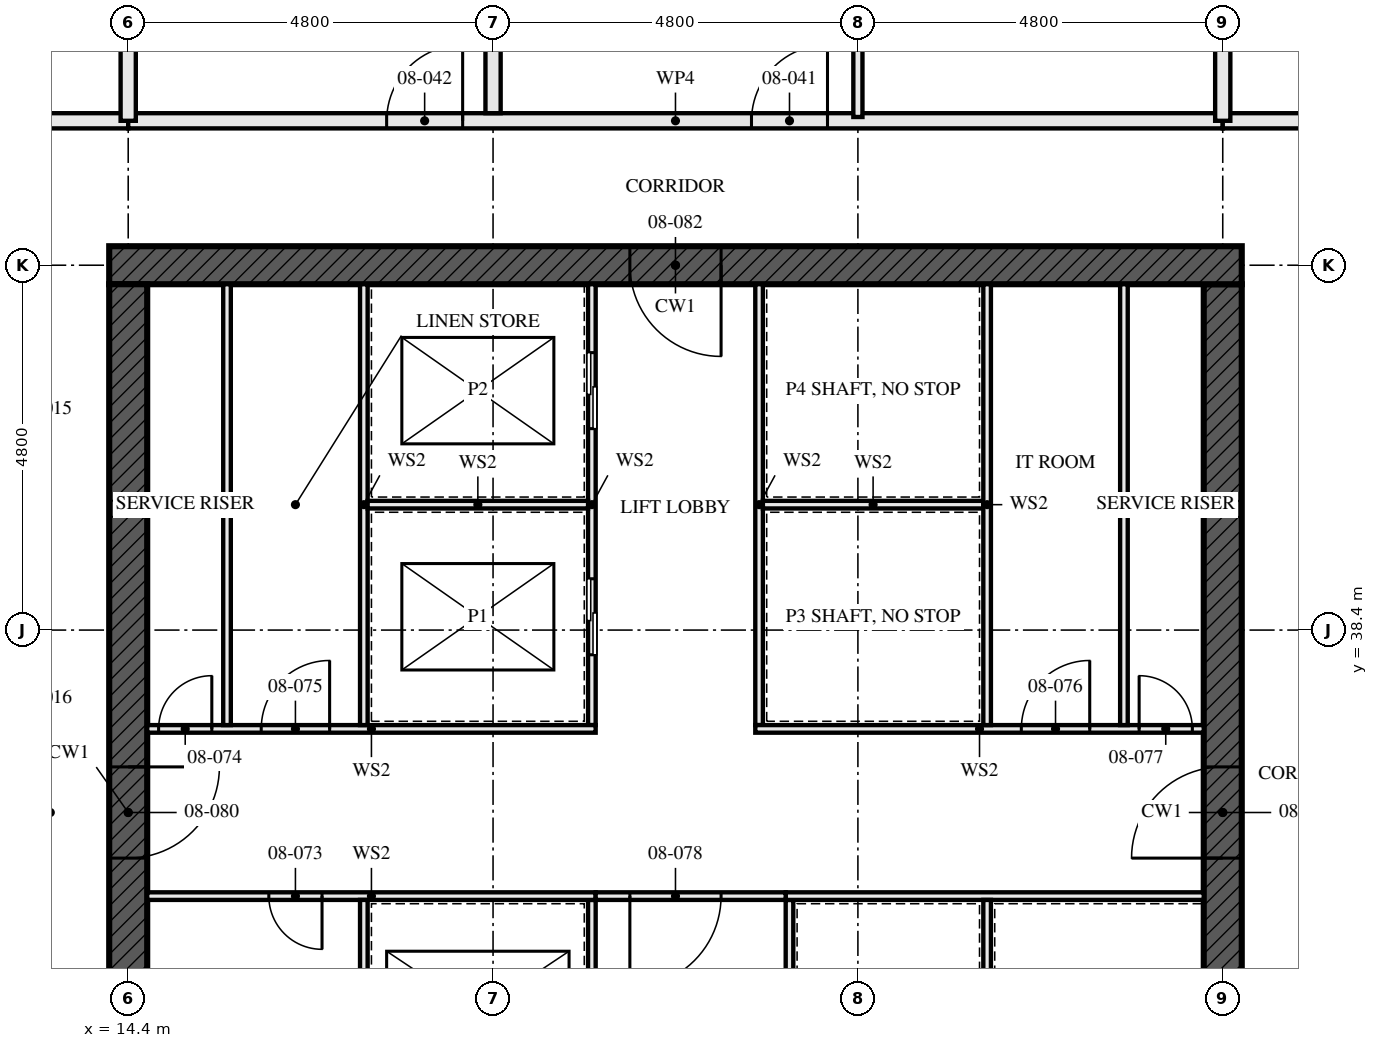
"""IFC4 building model, lengths in metres.
Left out: names, types, materials, properties, quantities, classifications, styles, units other than length and angle.
Written with IfcOpenShell. Run it as: python <this file> out.ifc"""

import sys

from ifc_helpers import new_model, si_unit, direction, frame, frame_2d, origin, place, context, subcontext, project, spatial, rectangle, extrude, element, fill, save


model = new_model("IFC4")
c1 = context("Model", 3, precision=1e-05, world=origin(), true_north=direction((0.0, 1.0)))
c2 = subcontext(c1, "Body", "Model", "MODEL_VIEW")
j1 = project(units=[si_unit("LENGTHUNIT", "METRE"), si_unit("PLANEANGLEUNIT", "RADIAN")], contexts=[c1])
p1 = place(None, origin())
s1 = spatial("IfcSite", under=j1, at=p1, CompositionType="ELEMENT")
p2 = place(p1, origin())
s2 = spatial("IfcBuilding", under=s1, at=p2, CompositionType="ELEMENT")
p3 = place(p2, frame((0.0, 0.0, 34.0)))
s3 = spatial("IfcBuildingStorey", under=s2, at=p3, CompositionType="ELEMENT", Elevation=34.0)
p4 = place(p3, frame((29.05, 43.2, -0.17), z_axis=(0.0, 0.0, 1.0), x_axis=(-1.0, 0.0, 0.0)))
e1 = element("IfcWall", 1, at=p4, inside=s3, PredefinedType="SHEAR", context=c2, shape_type="SweptSolid", body=[
    extrude(rectangle(XDim=14.9, YDim=0.5, at=frame_2d((7.45, 0.0))), origin(), (0.0, 0.0, 1.0), 3.5),
])
p5 = place(p4, frame((6.85, 0.0, 0.17)))
e2 = element("IfcOpeningElement", 2, at=p5, cuts=e1, PredefinedType="OPENING", context=c2, shape_type="SweptSolid", body=[
    extrude(rectangle(XDim=1.2, YDim=2.1, at=frame_2d((0.6, 1.05))), frame((0.0, 0.26, 0.0), z_axis=(0.0, -1.0, 0.0), x_axis=(1.0, 0.0, 0.0)), (0.0, 0.0, 1.0), 0.521),
])
p6 = place(p3, frame((14.4, 42.95, -0.17), z_axis=(0.0, 0.0, 1.0), x_axis=(0.0, -1.0, 0.0)))
e3 = element("IfcWall", 3, at=p6, inside=s3, PredefinedType="SHEAR", context=c2, shape_type="SweptSolid", body=[
    extrude(rectangle(XDim=13.9, YDim=0.5, at=frame_2d((6.95, 0.0))), origin(), (0.0, 0.0, 1.0), 3.5),
])
p7 = place(p6, frame((6.35, 0.0, 0.17)))
e4 = element("IfcOpeningElement", 4, at=p7, cuts=e3, PredefinedType="OPENING", context=c2, shape_type="SweptSolid", body=[
    extrude(rectangle(XDim=1.2, YDim=2.1, at=frame_2d((0.6, 1.05))), frame((0.0, 0.26, 0.0), z_axis=(0.0, -1.0, 0.0), x_axis=(1.0, 0.0, 0.0)), (0.0, 0.0, 1.0), 0.521),
])
p8 = place(p3, frame((28.8, 29.05, -0.17), z_axis=(0.0, 0.0, 1.0), x_axis=(0.0, 1.0, 0.0)))
e5 = element("IfcWall", 5, at=p8, inside=s3, PredefinedType="SHEAR", context=c2, shape_type="SweptSolid", body=[
    extrude(rectangle(XDim=13.9, YDim=0.5, at=frame_2d((6.95, 0.0))), origin(), (0.0, 0.0, 1.0), 3.5),
])
p9 = place(p8, frame((6.35, 0.0, 0.17)))
e6 = element("IfcOpeningElement", 6, at=p9, cuts=e5, PredefinedType="OPENING", context=c2, shape_type="SweptSolid", body=[
    extrude(rectangle(XDim=1.2, YDim=2.1, at=frame_2d((0.6, 1.05))), frame((0.0, 0.26, 0.0), z_axis=(0.0, -1.0, 0.0), x_axis=(1.0, 0.0, 0.0)), (0.0, 0.0, 1.0), 0.521),
])
p10 = place(p3, frame((14.4, 45.1, 0.0), z_axis=(0.0, 0.0, 1.0), x_axis=(-1.0, 0.0, 0.0)))
e7 = element("IfcWall", 7, at=p10, inside=s3, PredefinedType="PARTITIONING", context=c2, shape_type="SweptSolid", body=[
    extrude(rectangle(XDim=9.6, YDim=0.2, at=frame_2d((4.8, 0.0))), origin(), (0.0, 0.0, 1.0), 3.33),
])
p11 = place(p10, frame((5.2, 0.0, 0.0)))
e8 = element("IfcOpeningElement", 8, at=p11, cuts=e7, PredefinedType="OPENING", context=c2, shape_type="SweptSolid", body=[
    extrude(rectangle(XDim=1.0, YDim=2.1, at=frame_2d((0.5, 1.05))), frame((0.0, 0.111, 0.0), z_axis=(0.0, -1.0, 0.0), x_axis=(1.0, 0.0, 0.0)), (0.0, 0.0, 1.0), 0.221),
])
p12 = place(p3, frame((24.0, 51.9, 0.0), z_axis=(0.0, 0.0, 1.0), x_axis=(0.0, -1.0, 0.0)))
e9 = element("IfcWall", 9, at=p12, inside=s3, PredefinedType="PARTITIONING", context=c2, shape_type="SweptSolid", body=[
    extrude(rectangle(XDim=6.75, YDim=0.12, at=frame_2d((3.375, 0.0))), origin(), (0.0, 0.0, 1.0), 2.55),
])
p13 = place(p12, frame((2.925, 0.0, 0.0)))
e10 = element("IfcOpeningElement", 10, at=p13, cuts=e9, PredefinedType="OPENING", context=c2, shape_type="SweptSolid", body=[
    extrude(rectangle(XDim=0.9, YDim=2.1, at=frame_2d((0.45, 1.05))), frame((0.0, 0.071, 0.0), z_axis=(0.0, -1.0, 0.0), x_axis=(1.0, 0.0, 0.0)), (0.0, 0.0, 1.0), 0.141),
])
p14 = place(p3, frame((19.2, 57.255, 0.0), z_axis=(0.0, 0.0, 1.0), x_axis=(0.0, -1.0, 0.0)))
e11 = element("IfcWall", 11, at=p14, inside=s3, PredefinedType="PARTITIONING", context=c2, shape_type="SweptSolid", body=[
    extrude(rectangle(XDim=12.055, YDim=0.2, at=frame_2d((6.027, 0.0))), origin(), (0.0, 0.0, 1.0), 2.55),
])
p15 = place(p3, frame((28.8, 45.1, 0.0), z_axis=(0.0, 0.0, 1.0), x_axis=(-1.0, 0.0, 0.0)))
e12 = element("IfcWall", 12, at=p15, inside=s3, PredefinedType="PARTITIONING", context=c2, shape_type="SweptSolid", body=[
    extrude(rectangle(XDim=14.4, YDim=0.2, at=frame_2d((7.2, 0.0))), origin(), (0.0, 0.0, 1.0), 3.33),
])
p16 = place(p15, frame((5.2, 0.0, 0.0)))
e13 = element("IfcOpeningElement", 13, at=p16, cuts=e12, PredefinedType="OPENING", context=c2, shape_type="SweptSolid", body=[
    extrude(rectangle(XDim=1.0, YDim=2.1, at=frame_2d((0.5, 1.05))), frame((0.0, 0.111, 0.0), z_axis=(0.0, -1.0, 0.0), x_axis=(1.0, 0.0, 0.0)), (0.0, 0.0, 1.0), 0.221),
])
p17 = place(p15, frame((10.0, 0.0, 0.0)))
e14 = element("IfcOpeningElement", 14, at=p17, cuts=e12, PredefinedType="OPENING", context=c2, shape_type="SweptSolid", body=[
    extrude(rectangle(XDim=1.0, YDim=2.1, at=frame_2d((0.5, 1.05))), frame((0.0, 0.111, 0.0), z_axis=(0.0, -1.0, 0.0), x_axis=(1.0, 0.0, 0.0)), (0.0, 0.0, 1.0), 0.221),
])
p18 = place(p3, frame((38.4, 45.1, 0.0), z_axis=(0.0, 0.0, 1.0), x_axis=(-1.0, 0.0, 0.0)))
e15 = element("IfcWall", 15, at=p18, inside=s3, PredefinedType="PARTITIONING", context=c2, shape_type="SweptSolid", body=[
    extrude(rectangle(XDim=9.6, YDim=0.2, at=frame_2d((4.8, 0.0))), origin(), (0.0, 0.0, 1.0), 3.33),
])
p19 = place(p18, frame((0.4, 0.0, 0.0)))
e16 = element("IfcOpeningElement", 16, at=p19, cuts=e15, PredefinedType="OPENING", context=c2, shape_type="SweptSolid", body=[
    extrude(rectangle(XDim=1.0, YDim=2.1, at=frame_2d((0.5, 1.05))), frame((0.0, 0.111, 0.0), z_axis=(0.0, -1.0, 0.0), x_axis=(1.0, 0.0, 0.0)), (0.0, 0.0, 1.0), 0.221),
])
p20 = place(p18, frame((5.2, 0.0, 0.0)))
e17 = element("IfcOpeningElement", 17, at=p20, cuts=e15, PredefinedType="OPENING", context=c2, shape_type="SweptSolid", body=[
    extrude(rectangle(XDim=1.0, YDim=2.1, at=frame_2d((0.5, 1.05))), frame((0.0, 0.111, 0.0), z_axis=(0.0, -1.0, 0.0), x_axis=(1.0, 0.0, 0.0)), (0.0, 0.0, 1.0), 0.221),
])
for number, where, z_axis, x_axis in (
    (18, (15.7, 37.15, 0.0), (0.0, 0.0, 1.0), (0.0, 1.0, 0.0)),
    (19, (27.5, 37.15, 0.0), (0.0, 0.0, 1.0), (0.0, 1.0, 0.0)),
):
    element("IfcWall", number, at=place(p3, frame(where, z_axis=z_axis, x_axis=x_axis)), inside=s3, PredefinedType="SOLIDWALL", context=c2, shape_type="SweptSolid", body=[
        extrude(rectangle(XDim=5.8, YDim=0.1, at=frame_2d((2.9, 0.0))), origin(), (0.0, 0.0, 1.0), 3.33),
    ])
p21 = place(p3, frame((20.5, 29.05, 0.0), z_axis=(0.0, 0.0, 1.0), x_axis=(0.0, 1.0, 0.0)))
e20 = element("IfcWall", 20, at=p21, inside=s3, PredefinedType="SOLIDWALL", context=c2, shape_type="SweptSolid", body=[
    extrude(rectangle(XDim=5.8, YDim=0.1, at=frame_2d((2.9, 0.0))), origin(), (0.0, 0.0, 1.0), 3.33),
])
p22 = place(p21, frame((0.8, 0.0, 0.0)))
e21 = element("IfcOpeningElement", 21, at=p22, cuts=e20, PredefinedType="OPENING", context=c2, shape_type="SweptSolid", body=[
    extrude(rectangle(XDim=1.1, YDim=2.3, at=frame_2d((0.55, 1.15))), frame((0.0, 0.061, 0.0), z_axis=(0.0, -1.0, 0.0), x_axis=(1.0, 0.0, 0.0)), (0.0, 0.0, 1.0), 0.121),
])
p23 = place(p21, frame((3.775, 0.0, 0.0)))
e22 = element("IfcOpeningElement", 22, at=p23, cuts=e20, PredefinedType="OPENING", context=c2, shape_type="SweptSolid", body=[
    extrude(rectangle(XDim=1.1, YDim=2.3, at=frame_2d((0.55, 1.15))), frame((0.0, 0.061, 0.0), z_axis=(0.0, -1.0, 0.0), x_axis=(1.0, 0.0, 0.0)), (0.0, 0.0, 1.0), 0.121),
])
p24 = place(p3, frame((20.5, 37.15, 0.0), z_axis=(0.0, 0.0, 1.0), x_axis=(0.0, 1.0, 0.0)))
e23 = element("IfcWall", 23, at=p24, inside=s3, PredefinedType="SOLIDWALL", context=c2, shape_type="SweptSolid", body=[
    extrude(rectangle(XDim=5.8, YDim=0.1, at=frame_2d((2.9, 0.0))), origin(), (0.0, 0.0, 1.0), 3.33),
])
p25 = place(p24, frame((0.925, 0.0, 0.0)))
e24 = element("IfcOpeningElement", 24, at=p25, cuts=e23, PredefinedType="OPENING", context=c2, shape_type="SweptSolid", body=[
    extrude(rectangle(XDim=1.0, YDim=2.1, at=frame_2d((0.5, 1.05))), frame((0.0, 0.061, 0.0), z_axis=(0.0, -1.0, 0.0), x_axis=(1.0, 0.0, 0.0)), (0.0, 0.0, 1.0), 0.121),
])
p26 = place(p24, frame((3.9, 0.0, 0.0)))
e25 = element("IfcOpeningElement", 25, at=p26, cuts=e23, PredefinedType="OPENING", context=c2, shape_type="SweptSolid", body=[
    extrude(rectangle(XDim=1.0, YDim=2.1, at=frame_2d((0.5, 1.05))), frame((0.0, 0.061, 0.0), z_axis=(0.0, -1.0, 0.0), x_axis=(1.0, 0.0, 0.0)), (0.0, 0.0, 1.0), 0.121),
])
p27 = place(p3, frame((22.7, 37.15, 0.0), z_axis=(0.0, 0.0, 1.0), x_axis=(0.0, 1.0, 0.0)))
e26 = element("IfcWall", 26, at=p27, inside=s3, PredefinedType="SOLIDWALL", context=c2, shape_type="SweptSolid", body=[
    extrude(rectangle(XDim=5.8, YDim=0.1, at=frame_2d((2.9, 0.0))), origin(), (0.0, 0.0, 1.0), 3.33),
])
p28 = place(p3, frame((23.1, 29.05, 0.0), z_axis=(0.0, 0.0, 1.0), x_axis=(0.0, 1.0, 0.0)))
e27 = element("IfcWall", 27, at=p28, inside=s3, PredefinedType="SOLIDWALL", context=c2, shape_type="SweptSolid", body=[
    extrude(rectangle(XDim=5.8, YDim=0.1, at=frame_2d((2.9, 0.0))), origin(), (0.0, 0.0, 1.0), 3.33),
])
p29 = place(p28, frame((1.0, 0.0, 0.0)))
e28 = element("IfcOpeningElement", 28, at=p29, cuts=e27, PredefinedType="OPENING", context=c2, shape_type="SweptSolid", body=[
    extrude(rectangle(XDim=0.7, YDim=2.1, at=frame_2d((0.35, 1.05))), frame((0.0, 0.061, 0.0), z_axis=(0.0, -1.0, 0.0), x_axis=(1.0, 0.0, 0.0)), (0.0, 0.0, 1.0), 0.121),
])
p30 = place(p3, frame((14.65, 34.9, 0.0), z_axis=(0.0, 0.0, 1.0), x_axis=(1.0, 0.0, 0.0)))
e29 = element("IfcWall", 29, at=p30, inside=s3, PredefinedType="SOLIDWALL", context=c2, shape_type="SweptSolid", body=[
    extrude(rectangle(XDim=5.9, YDim=0.1, at=frame_2d((2.95, 0.0))), origin(), (0.0, 0.0, 1.0), 3.33),
])
p31 = place(p30, frame((1.6, 0.0, 0.0)))
e30 = element("IfcOpeningElement", 30, at=p31, cuts=e29, PredefinedType="OPENING", context=c2, shape_type="SweptSolid", body=[
    extrude(rectangle(XDim=0.7, YDim=2.1, at=frame_2d((0.35, 1.05))), frame((0.0, 0.061, 0.0), z_axis=(0.0, -1.0, 0.0), x_axis=(1.0, 0.0, 0.0)), (0.0, 0.0, 1.0), 0.121),
])
p32 = place(p3, frame((23.05, 34.9, 0.0), z_axis=(0.0, 0.0, 1.0), x_axis=(1.0, 0.0, 0.0)))
e31 = element("IfcWall", 31, at=p32, inside=s3, PredefinedType="SOLIDWALL", context=c2, shape_type="SweptSolid", body=[
    extrude(rectangle(XDim=5.5, YDim=0.1, at=frame_2d((2.75, 0.0))), origin(), (0.0, 0.0, 1.0), 3.33),
])
p33 = place(p3, frame((14.65, 37.1, 0.0), z_axis=(0.0, 0.0, 1.0), x_axis=(1.0, 0.0, 0.0)))
e32 = element("IfcWall", 32, at=p33, inside=s3, PredefinedType="SOLIDWALL", context=c2, shape_type="SweptSolid", body=[
    extrude(rectangle(XDim=5.9, YDim=0.1, at=frame_2d((2.95, 0.0))), origin(), (0.0, 0.0, 1.0), 3.33),
])
p34 = place(p33, frame((0.15, 0.0, 0.0)))
e33 = element("IfcOpeningElement", 33, at=p34, cuts=e32, PredefinedType="OPENING", context=c2, shape_type="SweptSolid", body=[
    extrude(rectangle(XDim=0.7, YDim=2.1, at=frame_2d((0.35, 1.05))), frame((0.0, 0.061, 0.0), z_axis=(0.0, -1.0, 0.0), x_axis=(1.0, 0.0, 0.0)), (0.0, 0.0, 1.0), 0.121),
])
p35 = place(p33, frame((1.5, 0.0, 0.0)))
e34 = element("IfcOpeningElement", 34, at=p35, cuts=e32, PredefinedType="OPENING", context=c2, shape_type="SweptSolid", body=[
    extrude(rectangle(XDim=0.9, YDim=2.1, at=frame_2d((0.45, 1.05))), frame((0.0, 0.061, 0.0), z_axis=(0.0, -1.0, 0.0), x_axis=(1.0, 0.0, 0.0)), (0.0, 0.0, 1.0), 0.121),
])
p36 = place(p3, frame((22.65, 37.1, 0.0), z_axis=(0.0, 0.0, 1.0), x_axis=(1.0, 0.0, 0.0)))
e35 = element("IfcWall", 35, at=p36, inside=s3, PredefinedType="SOLIDWALL", context=c2, shape_type="SweptSolid", body=[
    extrude(rectangle(XDim=5.9, YDim=0.1, at=frame_2d((2.95, 0.0))), origin(), (0.0, 0.0, 1.0), 3.33),
])
p37 = place(p36, frame((3.5, 0.0, 0.0)))
e36 = element("IfcOpeningElement", 36, at=p37, cuts=e35, PredefinedType="OPENING", context=c2, shape_type="SweptSolid", body=[
    extrude(rectangle(XDim=0.9, YDim=2.1, at=frame_2d((0.45, 1.05))), frame((0.0, 0.061, 0.0), z_axis=(0.0, -1.0, 0.0), x_axis=(1.0, 0.0, 0.0)), (0.0, 0.0, 1.0), 0.121),
])
p38 = place(p36, frame((5.05, 0.0, 0.0)))
e37 = element("IfcOpeningElement", 37, at=p38, cuts=e35, PredefinedType="OPENING", context=c2, shape_type="SweptSolid", body=[
    extrude(rectangle(XDim=0.7, YDim=2.1, at=frame_2d((0.35, 1.05))), frame((0.0, 0.061, 0.0), z_axis=(0.0, -1.0, 0.0), x_axis=(1.0, 0.0, 0.0)), (0.0, 0.0, 1.0), 0.121),
])
p39 = place(p3, frame((20.55, 34.9, 0.0), z_axis=(0.0, 0.0, 1.0), x_axis=(1.0, 0.0, 0.0)))
e38 = element("IfcWall", 38, at=p39, inside=s3, PredefinedType="SOLIDWALL", context=c2, shape_type="SweptSolid", body=[
    extrude(rectangle(XDim=2.5, YDim=0.1, at=frame_2d((1.25, 0.0))), origin(), (0.0, 0.0, 1.0), 3.33),
])
p40 = place(p39, frame((0.45, 0.0, 0.0)))
e39 = element("IfcOpeningElement", 39, at=p40, cuts=e38, PredefinedType="OPENING", context=c2, shape_type="SweptSolid", body=[
    extrude(rectangle(XDim=1.2, YDim=2.1, at=frame_2d((0.6, 1.05))), frame((0.0, 0.061, 0.0), z_axis=(0.0, -1.0, 0.0), x_axis=(1.0, 0.0, 0.0)), (0.0, 0.0, 1.0), 0.121),
])
for number, where, z_axis, x_axis in (
    (40, (17.5, 29.05, 0.0), (0.0, 0.0, 1.0), (0.0, 1.0, 0.0)),
    (41, (17.5, 37.15, 0.0), (0.0, 0.0, 1.0), (0.0, 1.0, 0.0)),
):
    element("IfcWall", number, at=place(p3, frame(where, z_axis=z_axis, x_axis=x_axis)), inside=s3, PredefinedType="SOLIDWALL", context=c2, shape_type="SweptSolid", body=[
        extrude(rectangle(XDim=5.8, YDim=0.1, at=frame_2d((2.9, 0.0))), origin(), (0.0, 0.0, 1.0), 3.33),
    ])
for number, where, z_axis, x_axis in (
    (42, (17.55, 40.05, 0.0), (0.0, 0.0, 1.0), (1.0, 0.0, 0.0)),
    (43, (22.75, 40.05, 0.0), (0.0, 0.0, 1.0), (1.0, 0.0, 0.0)),
):
    element("IfcWall", number, at=place(p3, frame(where, z_axis=z_axis, x_axis=x_axis)), inside=s3, PredefinedType="SOLIDWALL", context=c2, shape_type="SweptSolid", body=[
        extrude(rectangle(XDim=2.9, YDim=0.1, at=frame_2d((1.45, 0.0))), origin(), (0.0, 0.0, 1.0), 3.33),
    ])
p41 = place(p3, frame((25.7, 37.15, 0.0), z_axis=(0.0, 0.0, 1.0), x_axis=(0.0, 1.0, 0.0)))
e44 = element("IfcWall", 44, at=p41, inside=s3, PredefinedType="SOLIDWALL", context=c2, shape_type="SweptSolid", body=[
    extrude(rectangle(XDim=5.8, YDim=0.1, at=frame_2d((2.9, 0.0))), origin(), (0.0, 0.0, 1.0), 3.33),
])
p42 = place(p3, frame((25.7, 31.95, 0.0), z_axis=(0.0, 0.0, 1.0), x_axis=(0.0, 1.0, 0.0)))
e45 = element("IfcWall", 45, at=p42, inside=s3, PredefinedType="SOLIDWALL", context=c2, shape_type="SweptSolid", body=[
    extrude(rectangle(XDim=2.9, YDim=0.1, at=frame_2d((1.45, 0.0))), origin(), (0.0, 0.0, 1.0), 3.33),
])
for number, where, z_axis, x_axis in (
    (46, (14.4, 45.1, 0.0), (0.0, 0.0, 1.0), (0.0, 1.0, 0.0)),
    (47, (28.8, 45.1, 0.0), (0.0, 0.0, 1.0), (0.0, 1.0, 0.0)),
):
    element("IfcWall", number, at=place(p3, frame(where, z_axis=z_axis, x_axis=x_axis)), inside=s3, PredefinedType="PARTITIONING", context=c2, shape_type="SweptSolid", body=[
        extrude(rectangle(XDim=2.53, YDim=0.2, at=frame_2d((1.265, 0.0))), origin(), (0.0, 0.0, 1.0), 2.32),
    ])
p43 = place(p16, frame((1.0, 0.0, 0.0), z_axis=(0.0, 0.0, 1.0), x_axis=(-1.0, 0.0, 0.0)))
e48 = element("IfcDoor", 48, at=p43, inside=s3, OperationType="SINGLE_SWING_LEFT", PredefinedType="DOOR", context=c2, shape_type="SweptSolid", body=[
    extrude(rectangle(XDim=1.0, YDim=2.1, at=frame_2d((0.5, 1.05))), frame((0.0, 0.027, 0.0), z_axis=(0.0, -1.0, 0.0), x_axis=(1.0, 0.0, 0.0)), (0.0, 0.0, 1.0), 0.054),
])
fill(e13, e48)
p44 = place(p17, frame((1.0, 0.0, 0.0), z_axis=(0.0, 0.0, 1.0), x_axis=(-1.0, 0.0, 0.0)))
e49 = element("IfcDoor", 49, at=p44, inside=s3, OperationType="SINGLE_SWING_LEFT", PredefinedType="DOOR", context=c2, shape_type="SweptSolid", body=[
    extrude(rectangle(XDim=1.0, YDim=2.1, at=frame_2d((0.5, 1.05))), frame((0.0, 0.027, 0.0), z_axis=(0.0, -1.0, 0.0), x_axis=(1.0, 0.0, 0.0)), (0.0, 0.0, 1.0), 0.054),
])
fill(e14, e49)
p45 = place(p25, origin())
e50 = element("IfcDoor", 50, at=p45, inside=s3, OperationType="SLIDING_TO_LEFT", PredefinedType="DOOR", context=c2, shape_type="SweptSolid", body=[
    extrude(rectangle(XDim=1.0, YDim=2.1, at=frame_2d((0.5, 1.05))), frame((0.0, 0.05, 0.0), z_axis=(0.0, -1.0, 0.0), x_axis=(1.0, 0.0, 0.0)), (0.0, 0.0, 1.0), 0.1),
])
fill(e24, e50)
p46 = place(p26, origin())
e51 = element("IfcDoor", 51, at=p46, inside=s3, OperationType="SLIDING_TO_LEFT", PredefinedType="DOOR", context=c2, shape_type="SweptSolid", body=[
    extrude(rectangle(XDim=1.0, YDim=2.1, at=frame_2d((0.5, 1.05))), frame((0.0, 0.05, 0.0), z_axis=(0.0, -1.0, 0.0), x_axis=(1.0, 0.0, 0.0)), (0.0, 0.0, 1.0), 0.1),
])
fill(e25, e51)
p47 = place(p31, frame((0.7, 0.0, 0.0), z_axis=(0.0, 0.0, 1.0), x_axis=(-1.0, 0.0, 0.0)))
e52 = element("IfcDoor", 52, at=p47, inside=s3, OperationType="SINGLE_SWING_RIGHT", PredefinedType="DOOR", context=c2, shape_type="SweptSolid", body=[
    extrude(rectangle(XDim=0.7, YDim=2.1, at=frame_2d((0.35, 1.05))), frame((0.0, 0.027, 0.0), z_axis=(0.0, -1.0, 0.0), x_axis=(1.0, 0.0, 0.0)), (0.0, 0.0, 1.0), 0.054),
])
fill(e30, e52)
p48 = place(p34, origin())
e53 = element("IfcDoor", 53, at=p48, inside=s3, OperationType="SINGLE_SWING_LEFT", PredefinedType="DOOR", context=c2, shape_type="SweptSolid", body=[
    extrude(rectangle(XDim=0.7, YDim=2.1, at=frame_2d((0.35, 1.05))), frame((0.0, 0.027, 0.0), z_axis=(0.0, -1.0, 0.0), x_axis=(1.0, 0.0, 0.0)), (0.0, 0.0, 1.0), 0.054),
])
fill(e33, e53)
p49 = place(p35, origin())
e54 = element("IfcDoor", 54, at=p49, inside=s3, OperationType="SINGLE_SWING_LEFT", PredefinedType="DOOR", context=c2, shape_type="SweptSolid", body=[
    extrude(rectangle(XDim=0.9, YDim=2.1, at=frame_2d((0.45, 1.05))), frame((0.0, 0.027, 0.0), z_axis=(0.0, -1.0, 0.0), x_axis=(1.0, 0.0, 0.0)), (0.0, 0.0, 1.0), 0.054),
])
fill(e34, e54)
p50 = place(p37, origin())
e55 = element("IfcDoor", 55, at=p50, inside=s3, OperationType="SINGLE_SWING_LEFT", PredefinedType="DOOR", context=c2, shape_type="SweptSolid", body=[
    extrude(rectangle(XDim=0.9, YDim=2.1, at=frame_2d((0.45, 1.05))), frame((0.0, 0.027, 0.0), z_axis=(0.0, -1.0, 0.0), x_axis=(1.0, 0.0, 0.0)), (0.0, 0.0, 1.0), 0.054),
])
fill(e36, e55)
p51 = place(p38, origin())
e56 = element("IfcDoor", 56, at=p51, inside=s3, OperationType="SINGLE_SWING_RIGHT", PredefinedType="DOOR", context=c2, shape_type="SweptSolid", body=[
    extrude(rectangle(XDim=0.7, YDim=2.1, at=frame_2d((0.35, 1.05))), frame((0.0, 0.027, 0.0), z_axis=(0.0, -1.0, 0.0), x_axis=(1.0, 0.0, 0.0)), (0.0, 0.0, 1.0), 0.054),
])
fill(e37, e56)
p52 = place(p40, frame((1.2, 0.0, 0.0), z_axis=(0.0, 0.0, 1.0), x_axis=(-1.0, 0.0, 0.0)))
e57 = element("IfcDoor", 57, at=p52, inside=s3, OperationType="SINGLE_SWING_LEFT", PredefinedType="DOOR", context=c2, shape_type="SweptSolid", body=[
    extrude(rectangle(XDim=1.2, YDim=2.1, at=frame_2d((0.6, 1.05))), frame((0.0, 0.027, 0.0), z_axis=(0.0, -1.0, 0.0), x_axis=(1.0, 0.0, 0.0)), (0.0, 0.0, 1.0), 0.054),
])
fill(e39, e57)
p53 = place(p7, origin())
e58 = element("IfcDoor", 58, at=p53, inside=s3, OperationType="SINGLE_SWING_LEFT", PredefinedType="DOOR", context=c2, shape_type="SweptSolid", body=[
    extrude(rectangle(XDim=1.2, YDim=2.1, at=frame_2d((0.6, 1.05))), frame((0.0, 0.027, 0.0), z_axis=(0.0, -1.0, 0.0), x_axis=(1.0, 0.0, 0.0)), (0.0, 0.0, 1.0), 0.054),
])
fill(e4, e58)
p54 = place(p9, origin())
e59 = element("IfcDoor", 59, at=p54, inside=s3, OperationType="SINGLE_SWING_LEFT", PredefinedType="DOOR", context=c2, shape_type="SweptSolid", body=[
    extrude(rectangle(XDim=1.2, YDim=2.1, at=frame_2d((0.6, 1.05))), frame((0.0, 0.027, 0.0), z_axis=(0.0, -1.0, 0.0), x_axis=(1.0, 0.0, 0.0)), (0.0, 0.0, 1.0), 0.054),
])
fill(e6, e59)
p55 = place(p5, origin())
e60 = element("IfcDoor", 60, at=p55, inside=s3, OperationType="SINGLE_SWING_LEFT", PredefinedType="DOOR", context=c2, shape_type="SweptSolid", body=[
    extrude(rectangle(XDim=1.2, YDim=2.1, at=frame_2d((0.6, 1.05))), frame((0.0, 0.027, 0.0), z_axis=(0.0, -1.0, 0.0), x_axis=(1.0, 0.0, 0.0)), (0.0, 0.0, 1.0), 0.054),
])
fill(e2, e60)
save(model, sys.argv[1])
